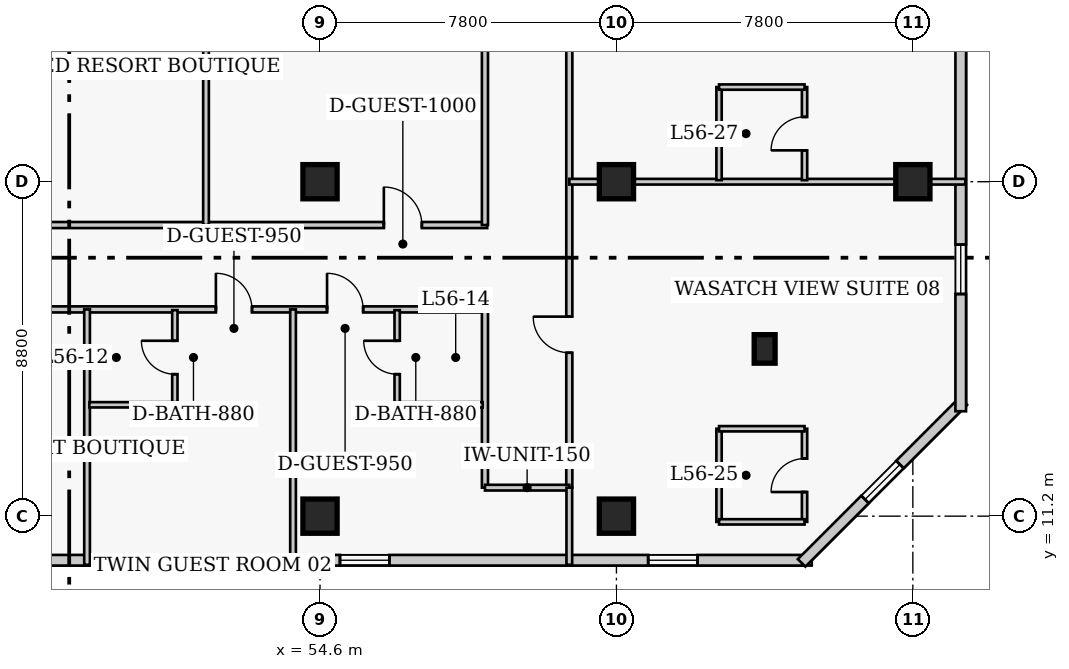
"""IFC4 building model, lengths in metres.
Left out: names, types, materials, properties, quantities, classifications, styles, units other than length and angle.
Written with IfcOpenShell. Run it as: python <this file> out.ifc"""

import sys

from ifc_helpers import new_model, si_unit, direction, frame, frame_2d, origin, origin_2d, place, context, subcontext, project, spatial, rectangle, extrude, element, fill, save


model = new_model("IFC4")
c1 = context("Model", 3, precision=1e-05, world=origin(), true_north=direction((0.0, 1.0)))
c2 = subcontext(c1, "Body", "Model", "MODEL_VIEW")
j1 = project(units=[si_unit("LENGTHUNIT", "METRE"), si_unit("PLANEANGLEUNIT", "RADIAN")], contexts=[c1])
p1 = place(None, origin())
s1 = spatial("IfcSite", under=j1, at=p1, CompositionType="ELEMENT")
p2 = place(p1, origin())
s2 = spatial("IfcBuilding", under=s1, at=p2, CompositionType="ELEMENT")
p3 = place(p2, frame((0.0, 0.0, 224.1)))
s3 = spatial("IfcBuildingStorey", under=s2, at=p3, CompositionType="ELEMENT", Elevation=224.1)
for number, where, z_axis, x_axis in (
    (1, (54.6, 11.2, 0.0), (0.0, 0.0, 1.0), (1.0, 0.0, 0.0)),
    (2, (54.6, 20.0, 0.0), (0.0, 0.0, 1.0), (1.0, 0.0, 0.0)),
    (3, (62.4, 11.2, 0.0), (0.0, 0.0, 1.0), (1.0, 0.0, 0.0)),
    (4, (62.4, 20.0, 0.0), (0.0, 0.0, 1.0), (1.0, 0.0, 0.0)),
    (5, (70.2, 20.0, 0.0), (0.0, 0.0, 1.0), (1.0, 0.0, 0.0)),
):
    element("IfcColumn", number, at=place(p3, frame(where, z_axis=z_axis, x_axis=x_axis)), inside=s3, PredefinedType="COLUMN", context=c2, shape_type="SweptSolid", body=[
        extrude(rectangle(XDim=0.9, YDim=0.9, at=origin_2d()), origin(), (0.0, 0.0, 1.0), 3.9),
    ])
p4 = place(p3, frame((66.3, 15.6, 0.0), z_axis=(0.0, 0.0, 1.0), x_axis=(1.0, 0.0, 0.0)))
e6 = element("IfcColumn", 6, at=p4, inside=s3, PredefinedType="PILASTER", context=c2, shape_type="SweptSolid", body=[
    extrude(rectangle(XDim=0.55, YDim=0.75, at=origin_2d()), origin(), (0.0, 0.0, 1.0), 3.9),
])
p5 = place(p3, frame((41.71, 10.04, 0.0), z_axis=(0.0, 0.0, 1.0), x_axis=(1.0, 0.0, 0.0)))
e7 = element("IfcWall", 7, at=p5, inside=s3, PredefinedType="SOLIDWALL", context=c2, shape_type="SweptSolid", body=[
    extrude(rectangle(XDim=25.83, YDim=0.28, at=frame_2d((12.915, 0.0))), origin(), (0.0, 0.0, 1.0), 3.65),
])
p6 = place(p5, frame((3.005, 0.0, 0.85)))
e8 = element("IfcOpeningElement", 8, at=p6, cuts=e7, PredefinedType="OPENING", context=c2, shape_type="SweptSolid", body=[
    extrude(rectangle(XDim=1.3, YDim=1.7, at=frame_2d((0.65, 0.85))), frame((0.0, 0.15, 0.0), z_axis=(0.0, -1.0, 0.0), x_axis=(1.0, 0.0, 0.0)), (0.0, 0.0, 1.0), 0.3),
])
p7 = place(p5, frame((13.415, 0.0, 0.85)))
e9 = element("IfcOpeningElement", 9, at=p7, cuts=e7, PredefinedType="OPENING", context=c2, shape_type="SweptSolid", body=[
    extrude(rectangle(XDim=1.3, YDim=1.7, at=frame_2d((0.65, 0.85))), frame((0.0, 0.15, 0.0), z_axis=(0.0, -1.0, 0.0), x_axis=(1.0, 0.0, 0.0)), (0.0, 0.0, 1.0), 0.3),
])
p8 = place(p5, frame((21.525, 0.0, 0.85)))
e10 = element("IfcOpeningElement", 10, at=p8, cuts=e7, PredefinedType="OPENING", context=c2, shape_type="SweptSolid", body=[
    extrude(rectangle(XDim=1.3, YDim=1.7, at=frame_2d((0.65, 0.85))), frame((0.0, 0.15, 0.0), z_axis=(0.0, -1.0, 0.0), x_axis=(1.0, 0.0, 0.0)), (0.0, 0.0, 1.0), 0.3),
])
p9 = place(p5, frame((8.83, 0.0, 0.85)))
e11 = element("IfcOpeningElement", 11, at=p9, cuts=e7, PredefinedType="OPENING", context=c2, shape_type="SweptSolid", body=[
    extrude(rectangle(XDim=1.3, YDim=1.7, at=frame_2d((0.65, 0.85))), frame((0.0, 0.15, 0.0), z_axis=(0.0, -1.0, 0.0), x_axis=(1.0, 0.0, 0.0)), (0.0, 0.0, 1.0), 0.3),
])
p10 = place(p3, frame((67.273, 9.971, 0.0), z_axis=(0.0, 0.0, 1.0), x_axis=(0.707106781187, 0.707106781187, 0.0)))
e12 = element("IfcWall", 12, at=p10, inside=s3, PredefinedType="SOLIDWALL", context=c2, shape_type="SweptSolid", body=[
    extrude(rectangle(XDim=6.02, YDim=0.28, at=frame_2d((3.01, 0.0))), origin(), (0.0, 0.0, 1.0), 3.65),
])
p11 = place(p10, frame((2.36, 0.0, 0.85)))
e13 = element("IfcOpeningElement", 13, at=p11, cuts=e12, PredefinedType="OPENING", context=c2, shape_type="SweptSolid", body=[
    extrude(rectangle(XDim=1.3, YDim=1.7, at=frame_2d((0.65, 0.85))), frame((0.0, 0.15, 0.0), z_axis=(0.0, -1.0, 0.0), x_axis=(1.0, 0.0, 0.0)), (0.0, 0.0, 1.0), 0.3),
])
p12 = place(p3, frame((71.46, 13.96, 0.0), z_axis=(0.0, 0.0, 1.0), x_axis=(0.0, 1.0, 0.0)))
e14 = element("IfcWall", 14, at=p12, inside=s3, PredefinedType="SOLIDWALL", context=c2, shape_type="SweptSolid", body=[
    extrude(rectangle(XDim=29.88, YDim=0.28, at=frame_2d((14.94, 0.0))), origin(), (0.0, 0.0, 1.0), 3.65),
])
p13 = place(p12, frame((3.085, 0.0, 0.85)))
e15 = element("IfcOpeningElement", 15, at=p13, cuts=e14, PredefinedType="OPENING", context=c2, shape_type="SweptSolid", body=[
    extrude(rectangle(XDim=1.3, YDim=1.7, at=frame_2d((0.65, 0.85))), frame((0.0, 0.15, 0.0), z_axis=(0.0, -1.0, 0.0), x_axis=(1.0, 0.0, 0.0)), (0.0, 0.0, 1.0), 0.3),
])
p14 = place(p12, frame((10.555, 0.0, 0.85)))
e16 = element("IfcOpeningElement", 16, at=p14, cuts=e14, PredefinedType="OPENING", context=c2, shape_type="SweptSolid", body=[
    extrude(rectangle(XDim=1.3, YDim=1.7, at=frame_2d((0.65, 0.85))), frame((0.0, 0.15, 0.0), z_axis=(0.0, -1.0, 0.0), x_axis=(1.0, 0.0, 0.0)), (0.0, 0.0, 1.0), 0.3),
])
p15 = place(p12, frame((18.025, 0.0, 0.85)))
e17 = element("IfcOpeningElement", 17, at=p15, cuts=e14, PredefinedType="OPENING", context=c2, shape_type="SweptSolid", body=[
    extrude(rectangle(XDim=1.3, YDim=1.7, at=frame_2d((0.65, 0.85))), frame((0.0, 0.15, 0.0), z_axis=(0.0, -1.0, 0.0), x_axis=(1.0, 0.0, 0.0)), (0.0, 0.0, 1.0), 0.3),
])
p16 = place(p12, frame((25.495, 0.0, 0.85)))
e18 = element("IfcOpeningElement", 18, at=p16, cuts=e14, PredefinedType="OPENING", context=c2, shape_type="SweptSolid", body=[
    extrude(rectangle(XDim=1.3, YDim=1.7, at=frame_2d((0.65, 0.85))), frame((0.0, 0.15, 0.0), z_axis=(0.0, -1.0, 0.0), x_axis=(1.0, 0.0, 0.0)), (0.0, 0.0, 1.0), 0.3),
])
p17 = place(p3, frame((35.85, 18.86, 0.0), z_axis=(0.0, 0.0, 1.0), x_axis=(1.0, 0.0, 0.0)))
e19 = element("IfcWall", 19, at=p17, inside=s3, PredefinedType="PARTITIONING", context=c2, shape_type="SweptSolid", body=[
    extrude(rectangle(XDim=23.15, YDim=0.16, at=frame_2d((11.575, 0.0))), origin(), (0.0, 0.0, 1.0), 3.65),
])
p18 = place(p17, frame((7.181, 0.0, 0.0)))
e20 = element("IfcOpeningElement", 20, at=p18, cuts=e19, PredefinedType="OPENING", context=c2, shape_type="SweptSolid", body=[
    extrude(rectangle(XDim=1.0, YDim=2.15, at=frame_2d((0.5, 1.075))), frame((0.0, 0.09, 0.0), z_axis=(0.0, -1.0, 0.0), x_axis=(1.0, 0.0, 0.0)), (0.0, 0.0, 1.0), 0.18),
])
p19 = place(p17, frame((20.43, 0.0, 0.0)))
e21 = element("IfcOpeningElement", 21, at=p19, cuts=e19, PredefinedType="OPENING", context=c2, shape_type="SweptSolid", body=[
    extrude(rectangle(XDim=1.0, YDim=2.15, at=frame_2d((0.5, 1.075))), frame((0.0, 0.09, 0.0), z_axis=(0.0, -1.0, 0.0), x_axis=(1.0, 0.0, 0.0)), (0.0, 0.0, 1.0), 0.18),
])
p20 = place(p3, frame((35.8, 16.64, 0.0), z_axis=(0.0, 0.0, 1.0), x_axis=(1.0, 0.0, 0.0)))
e22 = element("IfcWall", 22, at=p20, inside=s3, PredefinedType="PARTITIONING", context=c2, shape_type="SweptSolid", body=[
    extrude(rectangle(XDim=23.2, YDim=0.16, at=frame_2d((11.6, 0.0))), origin(), (0.0, 0.0, 1.0), 3.65),
])
p21 = place(p20, frame((1.518, 0.0, 0.0)))
e23 = element("IfcOpeningElement", 23, at=p21, cuts=e22, PredefinedType="OPENING", context=c2, shape_type="SweptSolid", body=[
    extrude(rectangle(XDim=0.95, YDim=2.1, at=frame_2d((0.475, 1.05))), frame((0.0, 0.09, 0.0), z_axis=(0.0, -1.0, 0.0), x_axis=(1.0, 0.0, 0.0)), (0.0, 0.0, 1.0), 0.18),
])
p22 = place(p20, frame((9.278, 0.0, 0.0)))
e24 = element("IfcOpeningElement", 24, at=p22, cuts=e22, PredefinedType="OPENING", context=c2, shape_type="SweptSolid", body=[
    extrude(rectangle(XDim=1.0, YDim=2.15, at=frame_2d((0.5, 1.075))), frame((0.0, 0.09, 0.0), z_axis=(0.0, -1.0, 0.0), x_axis=(1.0, 0.0, 0.0)), (0.0, 0.0, 1.0), 0.18),
])
p23 = place(p20, frame((16.06, 0.0, 0.0)))
e25 = element("IfcOpeningElement", 25, at=p23, cuts=e22, PredefinedType="OPENING", context=c2, shape_type="SweptSolid", body=[
    extrude(rectangle(XDim=0.95, YDim=2.1, at=frame_2d((0.475, 1.05))), frame((0.0, 0.09, 0.0), z_axis=(0.0, -1.0, 0.0), x_axis=(1.0, 0.0, 0.0)), (0.0, 0.0, 1.0), 0.18),
])
p24 = place(p20, frame((18.985, 0.0, 0.0)))
e26 = element("IfcOpeningElement", 26, at=p24, cuts=e22, PredefinedType="OPENING", context=c2, shape_type="SweptSolid", body=[
    extrude(rectangle(XDim=0.95, YDim=2.1, at=frame_2d((0.475, 1.05))), frame((0.0, 0.09, 0.0), z_axis=(0.0, -1.0, 0.0), x_axis=(1.0, 0.0, 0.0)), (0.0, 0.0, 1.0), 0.18),
])
p25 = place(p3, frame((61.16, 11.95, 0.0), z_axis=(0.0, 0.0, 1.0), x_axis=(0.0, 1.0, 0.0)))
e27 = element("IfcWall", 27, at=p25, inside=s3, PredefinedType="PARTITIONING", context=c2, shape_type="SweptSolid", body=[
    extrude(rectangle(XDim=28.7, YDim=0.16, at=frame_2d((14.35, 0.0))), origin(), (0.0, 0.0, 1.0), 3.65),
])
p26 = place(p25, frame((3.55, 0.0, 0.0)))
e28 = element("IfcOpeningElement", 28, at=p26, cuts=e27, PredefinedType="OPENING", context=c2, shape_type="SweptSolid", body=[
    extrude(rectangle(XDim=0.95, YDim=2.1, at=frame_2d((0.475, 1.05))), frame((0.0, 0.09, 0.0), z_axis=(0.0, -1.0, 0.0), x_axis=(1.0, 0.0, 0.0)), (0.0, 0.0, 1.0), 0.18),
])
p27 = place(p25, frame((11.975, 0.0, 0.0)))
e29 = element("IfcOpeningElement", 29, at=p27, cuts=e27, PredefinedType="OPENING", context=c2, shape_type="SweptSolid", body=[
    extrude(rectangle(XDim=0.95, YDim=2.1, at=frame_2d((0.475, 1.05))), frame((0.0, 0.09, 0.0), z_axis=(0.0, -1.0, 0.0), x_axis=(1.0, 0.0, 0.0)), (0.0, 0.0, 1.0), 0.18),
])
p28 = place(p25, frame((20.425, 0.0, 0.0)))
e30 = element("IfcOpeningElement", 30, at=p28, cuts=e27, PredefinedType="OPENING", context=c2, shape_type="SweptSolid", body=[
    extrude(rectangle(XDim=0.95, YDim=2.1, at=frame_2d((0.475, 1.05))), frame((0.0, 0.09, 0.0), z_axis=(0.0, -1.0, 0.0), x_axis=(1.0, 0.0, 0.0)), (0.0, 0.0, 1.0), 0.18),
])
p29 = place(p25, frame((27.26, 0.0, 0.0)))
e31 = element("IfcOpeningElement", 31, at=p29, cuts=e27, PredefinedType="OPENING", context=c2, shape_type="SweptSolid", body=[
    extrude(rectangle(XDim=1.0, YDim=2.15, at=frame_2d((0.5, 1.075))), frame((0.0, 0.09, 0.0), z_axis=(0.0, -1.0, 0.0), x_axis=(1.0, 0.0, 0.0)), (0.0, 0.0, 1.0), 0.18),
])
p30 = place(p3, frame((58.94, 18.86, 0.0), z_axis=(0.0, 0.0, 1.0), x_axis=(0.0, 1.0, 0.0)))
e32 = element("IfcWall", 32, at=p30, inside=s3, PredefinedType="PARTITIONING", context=c2, shape_type="SweptSolid", body=[
    extrude(rectangle(XDim=21.79, YDim=0.16, at=frame_2d((10.895, 0.0))), origin(), (0.0, 0.0, 1.0), 3.65),
])
p31 = place(p3, frame((58.94, 11.95, 0.0), z_axis=(0.0, 0.0, 1.0), x_axis=(0.0, 1.0, 0.0)))
e33 = element("IfcWall", 33, at=p31, inside=s3, PredefinedType="PARTITIONING", context=c2, shape_type="SweptSolid", body=[
    extrude(rectangle(XDim=4.69, YDim=0.16, at=frame_2d((2.345, 0.0))), origin(), (0.0, 0.0, 1.0), 3.65),
])
p32 = place(p3, frame((58.94, 11.95, 0.0), z_axis=(0.0, 0.0, 1.0), x_axis=(1.0, 0.0, 0.0)))
e34 = element("IfcWall", 34, at=p32, inside=s3, PredefinedType="PARTITIONING", context=c2, shape_type="SweptSolid", body=[
    extrude(rectangle(XDim=2.22, YDim=0.15, at=frame_2d((1.11, 0.0))), origin(), (0.0, 0.0, 1.0), 3.65),
])
p33 = place(p3, frame((51.6, 18.86, 0.0), z_axis=(0.0, 0.0, 1.0), x_axis=(0.0, 1.0, 0.0)))
e35 = element("IfcWall", 35, at=p33, inside=s3, PredefinedType="PARTITIONING", context=c2, shape_type="SweptSolid", body=[
    extrude(rectangle(XDim=8.29, YDim=0.15, at=frame_2d((4.145, 0.0))), origin(), (0.0, 0.0, 1.0), 3.65),
])
p34 = place(p3, frame((48.47, 9.92, 0.0), z_axis=(0.0, 0.0, 1.0), x_axis=(0.0, 1.0, 0.0)))
e36 = element("IfcWall", 36, at=p34, inside=s3, PredefinedType="PARTITIONING", context=c2, shape_type="SweptSolid", body=[
    extrude(rectangle(XDim=6.72, YDim=0.15, at=frame_2d((3.36, 0.0))), origin(), (0.0, 0.0, 1.0), 3.65),
])
p35 = place(p3, frame((50.78, 14.13, 0.0), z_axis=(0.0, 0.0, 1.0), x_axis=(0.0, 1.0, 0.0)))
e37 = element("IfcWall", 37, at=p35, inside=s3, PredefinedType="PLUMBINGWALL", context=c2, shape_type="SweptSolid", body=[
    extrude(rectangle(XDim=2.49, YDim=0.14, at=frame_2d((1.245, 0.0))), origin(), (0.0, 0.0, 1.0), 3.246),
])
p36 = place(p35, frame((0.805, 0.0, 0.0)))
e38 = element("IfcOpeningElement", 38, at=p36, cuts=e37, PredefinedType="OPENING", context=c2, shape_type="SweptSolid", body=[
    extrude(rectangle(XDim=0.88, YDim=2.05, at=frame_2d((0.44, 1.025))), frame((0.0, 0.08, 0.0), z_axis=(0.0, -1.0, 0.0), x_axis=(1.0, 0.0, 0.0)), (0.0, 0.0, 1.0), 0.16),
])
p37 = place(p3, frame((48.53, 14.13, 0.0), z_axis=(0.0, 0.0, 1.0), x_axis=(1.0, 0.0, 0.0)))
e39 = element("IfcWall", 39, at=p37, inside=s3, PredefinedType="PLUMBINGWALL", context=c2, shape_type="SweptSolid", body=[
    extrude(rectangle(XDim=2.25, YDim=0.14, at=frame_2d((1.125, 0.0))), origin(), (0.0, 0.0, 1.0), 3.65),
])
p38 = place(p3, frame((53.89, 9.92, 0.0), z_axis=(0.0, 0.0, 1.0), x_axis=(0.0, 1.0, 0.0)))
e40 = element("IfcWall", 40, at=p38, inside=s3, PredefinedType="PARTITIONING", context=c2, shape_type="SweptSolid", body=[
    extrude(rectangle(XDim=6.72, YDim=0.15, at=frame_2d((3.36, 0.0))), origin(), (0.0, 0.0, 1.0), 3.65),
])
p39 = place(p3, frame((56.63, 14.13, 0.0), z_axis=(0.0, 0.0, 1.0), x_axis=(0.0, 1.0, 0.0)))
e41 = element("IfcWall", 41, at=p39, inside=s3, PredefinedType="PLUMBINGWALL", context=c2, shape_type="SweptSolid", body=[
    extrude(rectangle(XDim=2.49, YDim=0.14, at=frame_2d((1.245, 0.0))), origin(), (0.0, 0.0, 1.0), 3.65),
])
p40 = place(p39, frame((0.805, 0.0, 0.0)))
e42 = element("IfcOpeningElement", 42, at=p40, cuts=e41, PredefinedType="OPENING", context=c2, shape_type="SweptSolid", body=[
    extrude(rectangle(XDim=0.88, YDim=2.05, at=frame_2d((0.44, 1.025))), frame((0.0, 0.08, 0.0), z_axis=(0.0, -1.0, 0.0), x_axis=(1.0, 0.0, 0.0)), (0.0, 0.0, 1.0), 0.16),
])
p41 = place(p3, frame((56.63, 14.13, 0.0), z_axis=(0.0, 0.0, 1.0), x_axis=(1.0, 0.0, 0.0)))
e43 = element("IfcWall", 43, at=p41, inside=s3, PredefinedType="PLUMBINGWALL", context=c2, shape_type="SweptSolid", body=[
    extrude(rectangle(XDim=2.25, YDim=0.14, at=frame_2d((1.125, 0.0))), origin(), (0.0, 0.0, 1.0), 3.65),
])
p42 = place(p3, frame((61.16, 9.92, 0.0), z_axis=(0.0, 0.0, 1.0), x_axis=(0.0, 1.0, 0.0)))
e44 = element("IfcWall", 44, at=p42, inside=s3, PredefinedType="PARTITIONING", context=c2, shape_type="SweptSolid", body=[
    extrude(rectangle(XDim=2.03, YDim=0.15, at=frame_2d((1.015, 0.0))), origin(), (0.0, 0.0, 1.0), 3.65),
])
p43 = place(p3, frame((65.1, 11.05, 0.0), z_axis=(0.0, 0.0, 1.0), x_axis=(0.0, 1.0, 0.0)))
e45 = element("IfcWall", 45, at=p43, inside=s3, PredefinedType="PLUMBINGWALL", context=c2, shape_type="SweptSolid", body=[
    extrude(rectangle(XDim=2.45, YDim=0.14, at=frame_2d((1.225, 0.0))), origin(), (0.0, 0.0, 1.0), 3.65),
])
p44 = place(p3, frame((67.35, 11.05, 0.0), z_axis=(0.0, 0.0, 1.0), x_axis=(0.0, 1.0, 0.0)))
e46 = element("IfcWall", 46, at=p44, inside=s3, PredefinedType="PLUMBINGWALL", context=c2, shape_type="SweptSolid", body=[
    extrude(rectangle(XDim=2.45, YDim=0.14, at=frame_2d((1.225, 0.0))), origin(), (0.0, 0.0, 1.0), 3.65),
])
p45 = place(p44, frame((0.785, 0.0, 0.0)))
e47 = element("IfcOpeningElement", 47, at=p45, cuts=e46, PredefinedType="OPENING", context=c2, shape_type="SweptSolid", body=[
    extrude(rectangle(XDim=0.88, YDim=2.05, at=frame_2d((0.44, 1.025))), frame((0.0, 0.08, 0.0), z_axis=(0.0, -1.0, 0.0), x_axis=(1.0, 0.0, 0.0)), (0.0, 0.0, 1.0), 0.16),
])
for number, where, z_axis, x_axis in (
    (48, (65.1, 11.05, 0.0), (0.0, 0.0, 1.0), (1.0, 0.0, 0.0)),
    (49, (65.1, 13.5, 0.0), (0.0, 0.0, 1.0), (1.0, 0.0, 0.0)),
):
    element("IfcWall", number, at=place(p3, frame(where, z_axis=z_axis, x_axis=x_axis)), inside=s3, PredefinedType="PLUMBINGWALL", context=c2, shape_type="SweptSolid", body=[
        extrude(rectangle(XDim=2.25, YDim=0.14, at=frame_2d((1.125, 0.0))), origin(), (0.0, 0.0, 1.0), 3.65),
    ])
p46 = place(p3, frame((61.16, 20.0, 0.0), z_axis=(0.0, 0.0, 1.0), x_axis=(1.0, 0.0, 0.0)))
e50 = element("IfcWall", 50, at=p46, inside=s3, PredefinedType="PARTITIONING", context=c2, shape_type="SweptSolid", body=[
    extrude(rectangle(XDim=10.42, YDim=0.15, at=frame_2d((5.21, 0.0))), origin(), (0.0, 0.0, 1.0), 2.878),
])
p47 = place(p3, frame((65.1, 20.04, 0.0), z_axis=(0.0, 0.0, 1.0), x_axis=(0.0, 1.0, 0.0)))
e51 = element("IfcWall", 51, at=p47, inside=s3, PredefinedType="PLUMBINGWALL", context=c2, shape_type="SweptSolid", body=[
    extrude(rectangle(XDim=2.45, YDim=0.14, at=frame_2d((1.225, 0.0))), origin(), (0.0, 0.0, 1.0), 3.65),
])
p48 = place(p3, frame((67.35, 20.04, 0.0), z_axis=(0.0, 0.0, 1.0), x_axis=(0.0, 1.0, 0.0)))
e52 = element("IfcWall", 52, at=p48, inside=s3, PredefinedType="PLUMBINGWALL", context=c2, shape_type="SweptSolid", body=[
    extrude(rectangle(XDim=2.45, YDim=0.14, at=frame_2d((1.225, 0.0))), origin(), (0.0, 0.0, 1.0), 3.65),
])
p49 = place(p48, frame((0.785, 0.0, 0.0)))
e53 = element("IfcOpeningElement", 53, at=p49, cuts=e52, PredefinedType="OPENING", context=c2, shape_type="SweptSolid", body=[
    extrude(rectangle(XDim=0.88, YDim=2.05, at=frame_2d((0.44, 1.025))), frame((0.0, 0.08, 0.0), z_axis=(0.0, -1.0, 0.0), x_axis=(1.0, 0.0, 0.0)), (0.0, 0.0, 1.0), 0.16),
])
p50 = place(p3, frame((65.1, 22.49, 0.0), z_axis=(0.0, 0.0, 1.0), x_axis=(1.0, 0.0, 0.0)))
e54 = element("IfcWall", 54, at=p50, inside=s3, PredefinedType="PLUMBINGWALL", context=c2, shape_type="SweptSolid", body=[
    extrude(rectangle(XDim=2.25, YDim=0.14, at=frame_2d((1.125, 0.0))), origin(), (0.0, 0.0, 1.0), 3.65),
])
p51 = place(p7, origin())
e55 = element("IfcWindow", 55, at=p51, inside=s3, PartitioningType="SINGLE_PANEL", PredefinedType="WINDOW", context=c2, shape_type="SweptSolid", body=[
    extrude(rectangle(XDim=1.3, YDim=1.7, at=frame_2d((0.65, 0.85))), frame((0.0, 0.03, 0.0), z_axis=(0.0, -1.0, 0.0), x_axis=(1.0, 0.0, 0.0)), (0.0, 0.0, 1.0), 0.06),
])
fill(e9, e55)
p52 = place(p8, origin())
e56 = element("IfcWindow", 56, at=p52, inside=s3, PartitioningType="SINGLE_PANEL", PredefinedType="WINDOW", context=c2, shape_type="SweptSolid", body=[
    extrude(rectangle(XDim=1.3, YDim=1.7, at=frame_2d((0.65, 0.85))), frame((0.0, 0.03, 0.0), z_axis=(0.0, -1.0, 0.0), x_axis=(1.0, 0.0, 0.0)), (0.0, 0.0, 1.0), 0.06),
])
fill(e10, e56)
p53 = place(p11, origin())
e57 = element("IfcWindow", 57, at=p53, inside=s3, PartitioningType="SINGLE_PANEL", PredefinedType="WINDOW", context=c2, shape_type="SweptSolid", body=[
    extrude(rectangle(XDim=1.3, YDim=1.7, at=frame_2d((0.65, 0.85))), frame((0.0, 0.03, 0.0), z_axis=(0.0, -1.0, 0.0), x_axis=(1.0, 0.0, 0.0)), (0.0, 0.0, 1.0), 0.06),
])
fill(e13, e57)
p54 = place(p13, origin())
e58 = element("IfcWindow", 58, at=p54, inside=s3, PartitioningType="SINGLE_PANEL", PredefinedType="WINDOW", context=c2, shape_type="SweptSolid", body=[
    extrude(rectangle(XDim=1.3, YDim=1.7, at=frame_2d((0.65, 0.85))), frame((0.0, 0.03, 0.0), z_axis=(0.0, -1.0, 0.0), x_axis=(1.0, 0.0, 0.0)), (0.0, 0.0, 1.0), 0.06),
])
fill(e15, e58)
p55 = place(p9, origin())
e59 = element("IfcWindow", 59, at=p55, inside=s3, PartitioningType="SINGLE_PANEL", PredefinedType="WINDOW", context=c2, shape_type="SweptSolid", body=[
    extrude(rectangle(XDim=1.3, YDim=1.7, at=frame_2d((0.65, 0.85))), frame((0.0, 0.03, 0.0), z_axis=(0.0, -1.0, 0.0), x_axis=(1.0, 0.0, 0.0)), (0.0, 0.0, 1.0), 0.06),
])
fill(e11, e59)
p56 = place(p19, origin())
e60 = element("IfcDoor", 60, at=p56, inside=s3, OperationType="SINGLE_SWING_LEFT", PredefinedType="DOOR", context=c2, shape_type="SweptSolid", body=[
    extrude(rectangle(XDim=1.0, YDim=2.15, at=frame_2d((0.5, 1.075))), frame((0.0, 0.025, 0.0), z_axis=(0.0, -1.0, 0.0), x_axis=(1.0, 0.0, 0.0)), (0.0, 0.0, 1.0), 0.05),
])
fill(e21, e60)
p57 = place(p36, origin())
e61 = element("IfcDoor", 61, at=p57, inside=s3, OperationType="SINGLE_SWING_RIGHT", PredefinedType="DOOR", context=c2, shape_type="SweptSolid", body=[
    extrude(rectangle(XDim=0.88, YDim=2.05, at=frame_2d((0.44, 1.025))), frame((0.0, 0.025, 0.0), z_axis=(0.0, -1.0, 0.0), x_axis=(1.0, 0.0, 0.0)), (0.0, 0.0, 1.0), 0.05),
])
fill(e38, e61)
p58 = place(p23, origin())
e62 = element("IfcDoor", 62, at=p58, inside=s3, OperationType="SINGLE_SWING_LEFT", PredefinedType="DOOR", context=c2, shape_type="SweptSolid", body=[
    extrude(rectangle(XDim=0.95, YDim=2.1, at=frame_2d((0.475, 1.05))), frame((0.0, 0.025, 0.0), z_axis=(0.0, -1.0, 0.0), x_axis=(1.0, 0.0, 0.0)), (0.0, 0.0, 1.0), 0.05),
])
fill(e25, e62)
p59 = place(p40, origin())
e63 = element("IfcDoor", 63, at=p59, inside=s3, OperationType="SINGLE_SWING_RIGHT", PredefinedType="DOOR", context=c2, shape_type="SweptSolid", body=[
    extrude(rectangle(XDim=0.88, YDim=2.05, at=frame_2d((0.44, 1.025))), frame((0.0, 0.025, 0.0), z_axis=(0.0, -1.0, 0.0), x_axis=(1.0, 0.0, 0.0)), (0.0, 0.0, 1.0), 0.05),
])
fill(e42, e63)
p60 = place(p24, origin())
e64 = element("IfcDoor", 64, at=p60, inside=s3, OperationType="SINGLE_SWING_LEFT", PredefinedType="DOOR", context=c2, shape_type="SweptSolid", body=[
    extrude(rectangle(XDim=0.95, YDim=2.1, at=frame_2d((0.475, 1.05))), frame((0.0, 0.025, 0.0), z_axis=(0.0, -1.0, 0.0), x_axis=(1.0, 0.0, 0.0)), (0.0, 0.0, 1.0), 0.05),
])
fill(e26, e64)
p61 = place(p45, origin())
e65 = element("IfcDoor", 65, at=p61, inside=s3, OperationType="SINGLE_SWING_LEFT", PredefinedType="DOOR", context=c2, shape_type="SweptSolid", body=[
    extrude(rectangle(XDim=0.88, YDim=2.05, at=frame_2d((0.44, 1.025))), frame((0.0, 0.025, 0.0), z_axis=(0.0, -1.0, 0.0), x_axis=(1.0, 0.0, 0.0)), (0.0, 0.0, 1.0), 0.05),
])
fill(e47, e65)
p62 = place(p26, origin())
e66 = element("IfcDoor", 66, at=p62, inside=s3, OperationType="SINGLE_SWING_RIGHT", PredefinedType="DOOR", context=c2, shape_type="SweptSolid", body=[
    extrude(rectangle(XDim=0.95, YDim=2.1, at=frame_2d((0.475, 1.05))), frame((0.0, 0.025, 0.0), z_axis=(0.0, -1.0, 0.0), x_axis=(1.0, 0.0, 0.0)), (0.0, 0.0, 1.0), 0.05),
])
fill(e28, e66)
p63 = place(p49, origin())
e67 = element("IfcDoor", 67, at=p63, inside=s3, OperationType="SINGLE_SWING_LEFT", PredefinedType="DOOR", context=c2, shape_type="SweptSolid", body=[
    extrude(rectangle(XDim=0.88, YDim=2.05, at=frame_2d((0.44, 1.025))), frame((0.0, 0.025, 0.0), z_axis=(0.0, -1.0, 0.0), x_axis=(1.0, 0.0, 0.0)), (0.0, 0.0, 1.0), 0.05),
])
fill(e53, e67)
save(model, sys.argv[1])
